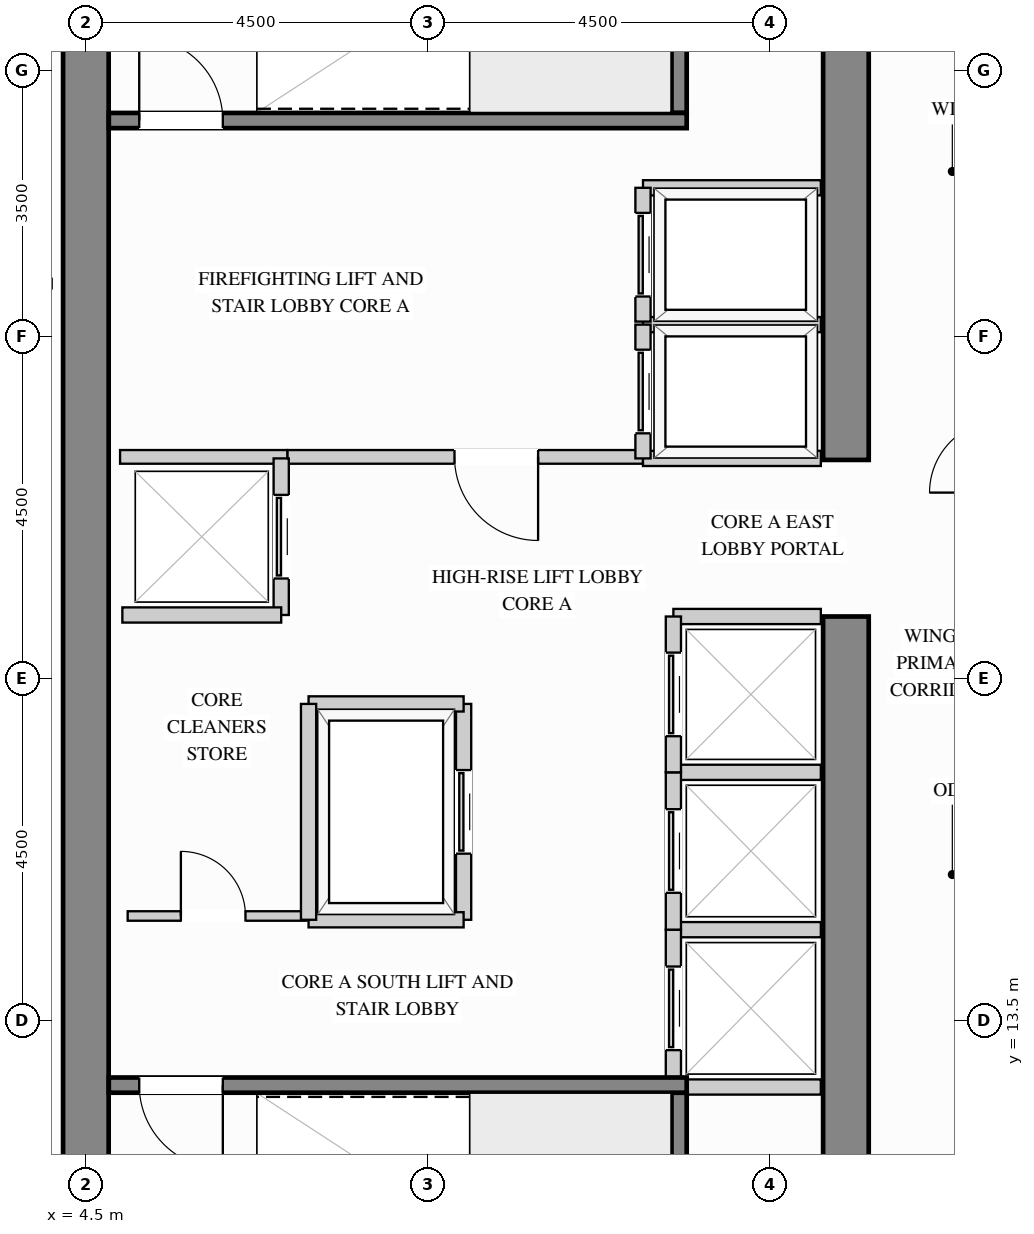
"""IFC4 building model, lengths in metres.
Left out: names, types, materials, properties, quantities, classifications, styles, units other than length and angle.
Written with IfcOpenShell. Run it as: python <this file> out.ifc"""

import sys

from ifc_helpers import new_model, si_unit, direction, frame, frame_2d, origin, place, context, subcontext, project, spatial, rectangle, extrude, source, transform, mapped, element, fill, save


model = new_model("IFC4")
c1 = context("Model", 3, precision=1e-05, world=origin(), true_north=direction((0.0, 1.0)))
c2 = subcontext(c1, "Body", "Model", "MODEL_VIEW")
j1 = project(units=[si_unit("LENGTHUNIT", "METRE"), si_unit("PLANEANGLEUNIT", "RADIAN")], contexts=[c1])
p1 = place(None, origin())
s1 = spatial("IfcSite", under=j1, at=p1, CompositionType="ELEMENT")
p2 = place(p1, origin())
s2 = spatial("IfcBuilding", under=s1, at=p2, CompositionType="ELEMENT")
p3 = place(p2, frame((0.0, 0.0, 179.1)))
s3 = spatial("IfcBuildingStorey", under=s2, at=p3, CompositionType="ELEMENT", Elevation=179.1)
m1 = source(origin(), c2, "Body", "SweptSolid", [
    extrude(rectangle(XDim=10.02, YDim=0.6, at=frame_2d((5.01, 0.0))), origin(), (0.0, 0.0, 1.0), 3.4),
])
p4 = place(p3, frame((14.5, 8.8, 0.0), z_axis=(0.0, 0.0, 1.0), x_axis=(0.0, 1.0, 0.0)))
e1 = element("IfcWall", 1, at=p4, inside=s3, PredefinedType="SHEAR", context=c2, shape_type="MappedRepresentation", body=[
    mapped(m1, transform((0.0, 0.0, 0.0), x_axis=(1.0, 0.0, 0.0), y_axis=(0.0, 1.0, 0.0), z_axis=(0.0, 0.0, 1.0))),
])
m2 = source(origin(), c2, "Body", "SweptSolid", [
    extrude(rectangle(XDim=8.32, YDim=0.6, at=frame_2d((4.16, 0.0))), origin(), (0.0, 0.0, 1.0), 3.4),
])
p5 = place(p3, frame((14.5, 20.88, 0.0), z_axis=(0.0, 0.0, 1.0), x_axis=(0.0, 1.0, 0.0)))
e2 = element("IfcWall", 2, at=p5, inside=s3, PredefinedType="SHEAR", context=c2, shape_type="MappedRepresentation", body=[
    mapped(m2, transform((0.0, 0.0, 0.0), x_axis=(1.0, 0.0, 0.0), y_axis=(0.0, 1.0, 0.0), z_axis=(0.0, 0.0, 1.0))),
])
m3 = source(origin(), c2, "Body", "SweptSolid", [
    extrude(rectangle(XDim=20.4, YDim=0.6, at=frame_2d((10.2, 0.0))), origin(), (0.0, 0.0, 1.0), 3.4),
])
p6 = place(p3, frame((4.5, 8.8, 0.0), z_axis=(0.0, 0.0, 1.0), x_axis=(0.0, 1.0, 0.0)))
e3 = element("IfcWall", 3, at=p6, inside=s3, PredefinedType="SHEAR", context=c2, shape_type="MappedRepresentation", body=[
    mapped(m3, transform((0.0, 0.0, 0.0), x_axis=(1.0, 0.0, 0.0), y_axis=(0.0, 1.0, 0.0), z_axis=(0.0, 0.0, 1.0))),
])
p7 = place(p3, frame((7.15, 20.92, 0.0), z_axis=(0.0, 0.0, 1.0), x_axis=(1.0, 0.0, 0.0)))
e4 = element("IfcWall", 4, at=p7, inside=s3, PredefinedType="PARTITIONING", context=c2, shape_type="SweptSolid", body=[
    extrude(rectangle(XDim=4.68, YDim=0.18, at=frame_2d((2.34, 0.0))), origin(), (0.0, 0.0, 1.0), 3.385),
])
p8 = place(p7, frame((2.2, 0.0, 0.0)))
e5 = element("IfcOpeningElement", 5, at=p8, cuts=e4, PredefinedType="OPENING", context=c2, shape_type="SweptSolid", body=[
    extrude(rectangle(XDim=1.1, YDim=2.15, at=frame_2d((0.55, 1.075))), frame((0.0, 0.1, 0.0), z_axis=(0.0, -1.0, 0.0), x_axis=(1.0, 0.0, 0.0)), (0.0, 0.0, 1.0), 0.2),
])
m4 = source(origin(), c2, "Body", "SweptSolid", [
    extrude(rectangle(XDim=2.2, YDim=0.18, at=frame_2d((1.1, 0.0))), origin(), (0.0, 0.0, 1.0), 3.385),
])
p9 = place(p3, frame((4.95, 20.92, 0.0), z_axis=(0.0, 0.0, 1.0), x_axis=(1.0, 0.0, 0.0)))
e6 = element("IfcWall", 6, at=p9, inside=s3, PredefinedType="PARTITIONING", context=c2, shape_type="MappedRepresentation", body=[
    mapped(m4, transform((0.0, 0.0, 0.0), x_axis=(1.0, 0.0, 0.0), y_axis=(0.0, 1.0, 0.0), z_axis=(0.0, 0.0, 1.0))),
])
p10 = place(p3, frame((5.05, 14.88, 0.0), z_axis=(0.0, 0.0, 1.0), x_axis=(1.0, 0.0, 0.0)))
e7 = element("IfcWall", 7, at=p10, inside=s3, PredefinedType="PARTITIONING", context=c2, shape_type="SweptSolid", body=[
    extrude(rectangle(XDim=2.35, YDim=0.125, at=frame_2d((1.175, 0.0))), origin(), (0.0, 0.0, 1.0), 3.385),
])
p11 = place(p10, frame((0.7, 0.0, 0.0)))
e8 = element("IfcOpeningElement", 8, at=p11, cuts=e7, PredefinedType="OPENING", context=c2, shape_type="SweptSolid", body=[
    extrude(rectangle(XDim=0.85, YDim=2.1, at=frame_2d((0.425, 1.05))), frame((0.0, 0.073, 0.0), z_axis=(0.0, -1.0, 0.0), x_axis=(1.0, 0.0, 0.0)), (0.0, 0.0, 1.0), 0.145),
])
m5 = source(origin(), c2, "Body", "SweptSolid", [
    extrude(rectangle(XDim=3.698, YDim=0.125, at=frame_2d((1.849, 0.0))), origin(), (0.0, 0.0, 1.0), 3.385),
])
p12 = place(p3, frame((0.352, 23.2, 0.0), z_axis=(0.0, 0.0, 1.0), x_axis=(1.0, 0.0, 0.0)))
e9 = element("IfcWall", 9, at=p12, inside=s3, PredefinedType="PARTITIONING", context=c2, shape_type="MappedRepresentation", body=[
    mapped(m5, transform((0.0, 0.0, 0.0), x_axis=(1.0, 0.0, 0.0), y_axis=(0.0, 1.0, 0.0), z_axis=(0.0, 0.0, 1.0))),
])
m6 = source(origin(), c2, "Body", "SweptSolid", [
    extrude(rectangle(XDim=2.34, YDim=0.2, at=frame_2d((1.17, 0.0))), origin(), (0.0, 0.0, 1.0), 3.385),
])
for number, where, z_axis, x_axis in (
    (10, (11.83, 22.66, 0.0), (0.0, 0.0, 1.0), (1.0, 0.0, 0.0)),
    (11, (11.83, 20.9, 0.0), (0.0, 0.0, 1.0), (1.0, 0.0, 0.0)),
):
    element("IfcWall", number, at=place(p3, frame(where, z_axis=z_axis, x_axis=x_axis)), inside=s3, PredefinedType="PARTITIONING", context=c2, shape_type="MappedRepresentation", body=[
        mapped(m6, transform((0.0, 0.0, 0.0), x_axis=(1.0, 0.0, 0.0), y_axis=(0.0, 1.0, 0.0), z_axis=(0.0, 0.0, 1.0))),
    ])
p13 = place(p3, frame((11.83, 20.9, 0.0), z_axis=(0.0, 0.0, 1.0), x_axis=(0.0, 1.0, 0.0)))
e12 = element("IfcWall", 12, at=p13, inside=s3, PredefinedType="PARTITIONING", context=c2, shape_type="SweptSolid", body=[
    extrude(rectangle(XDim=1.76, YDim=0.2, at=frame_2d((0.88, 0.0))), origin(), (0.0, 0.0, 1.0), 3.385),
])
p14 = place(p13, frame((0.33, 0.0, 0.0)))
e13 = element("IfcOpeningElement", 13, at=p14, cuts=e12, PredefinedType="OPENING", context=c2, shape_type="SweptSolid", body=[
    extrude(rectangle(XDim=1.1, YDim=2.2, at=frame_2d((0.55, 1.1))), frame((0.0, 0.11, 0.0), z_axis=(0.0, -1.0, 0.0), x_axis=(1.0, 0.0, 0.0)), (0.0, 0.0, 1.0), 0.22),
])
p15 = place(p3, frame((11.83, 24.46, 0.0), z_axis=(0.0, 0.0, 1.0), x_axis=(1.0, 0.0, 0.0)))
e14 = element("IfcWall", 14, at=p15, inside=s3, PredefinedType="PARTITIONING", context=c2, shape_type="MappedRepresentation", body=[
    mapped(m6, transform((0.0, 0.0, 0.0), x_axis=(1.0, 0.0, 0.0), y_axis=(0.0, 1.0, 0.0), z_axis=(0.0, 0.0, 1.0))),
])
p16 = place(p3, frame((11.83, 22.7, 0.0), z_axis=(0.0, 0.0, 1.0), x_axis=(0.0, 1.0, 0.0)))
e15 = element("IfcWall", 15, at=p16, inside=s3, PredefinedType="PARTITIONING", context=c2, shape_type="SweptSolid", body=[
    extrude(rectangle(XDim=1.76, YDim=0.2, at=frame_2d((0.88, 0.0))), origin(), (0.0, 0.0, 1.0), 3.385),
])
p17 = place(p16, frame((0.33, 0.0, 0.0)))
e16 = element("IfcOpeningElement", 16, at=p17, cuts=e15, PredefinedType="OPENING", context=c2, shape_type="SweptSolid", body=[
    extrude(rectangle(XDim=1.1, YDim=2.2, at=frame_2d((0.55, 1.1))), frame((0.0, 0.11, 0.0), z_axis=(0.0, -1.0, 0.0), x_axis=(1.0, 0.0, 0.0)), (0.0, 0.0, 1.0), 0.22),
])
m7 = source(origin(), c2, "Body", "SweptSolid", [
    extrude(rectangle(XDim=1.94, YDim=0.2, at=frame_2d((0.97, 0.0))), origin(), (0.0, 0.0, 1.0), 3.385),
])
for number, where, z_axis, x_axis in (
    (17, (12.23, 14.7, 0.0), (0.0, 0.0, 1.0), (1.0, 0.0, 0.0)),
    (18, (12.23, 12.63, 0.0), (0.0, 0.0, 1.0), (1.0, 0.0, 0.0)),
):
    element("IfcWall", number, at=place(p3, frame(where, z_axis=z_axis, x_axis=x_axis)), inside=s3, PredefinedType="PARTITIONING", context=c2, shape_type="MappedRepresentation", body=[
        mapped(m7, transform((0.0, 0.0, 0.0), x_axis=(1.0, 0.0, 0.0), y_axis=(0.0, 1.0, 0.0), z_axis=(0.0, 0.0, 1.0))),
    ])
p18 = place(p3, frame((12.23, 12.63, 0.0), z_axis=(0.0, 0.0, 1.0), x_axis=(0.0, 1.0, 0.0)))
e19 = element("IfcWall", 19, at=p18, inside=s3, PredefinedType="PARTITIONING", context=c2, shape_type="SweptSolid", body=[
    extrude(rectangle(XDim=2.07, YDim=0.2, at=frame_2d((1.035, 0.0))), origin(), (0.0, 0.0, 1.0), 3.385),
])
p19 = place(p18, frame((0.485, 0.0, 0.0)))
e20 = element("IfcOpeningElement", 20, at=p19, cuts=e19, PredefinedType="OPENING", context=c2, shape_type="SweptSolid", body=[
    extrude(rectangle(XDim=1.1, YDim=2.2, at=frame_2d((0.55, 1.1))), frame((0.0, 0.11, 0.0), z_axis=(0.0, -1.0, 0.0), x_axis=(1.0, 0.0, 0.0)), (0.0, 0.0, 1.0), 0.22),
])
p20 = place(p3, frame((12.23, 16.77, 0.0), z_axis=(0.0, 0.0, 1.0), x_axis=(1.0, 0.0, 0.0)))
e21 = element("IfcWall", 21, at=p20, inside=s3, PredefinedType="PARTITIONING", context=c2, shape_type="MappedRepresentation", body=[
    mapped(m7, transform((0.0, 0.0, 0.0), x_axis=(1.0, 0.0, 0.0), y_axis=(0.0, 1.0, 0.0), z_axis=(0.0, 0.0, 1.0))),
])
p21 = place(p3, frame((12.23, 14.7, 0.0), z_axis=(0.0, 0.0, 1.0), x_axis=(0.0, 1.0, 0.0)))
e22 = element("IfcWall", 22, at=p21, inside=s3, PredefinedType="PARTITIONING", context=c2, shape_type="SweptSolid", body=[
    extrude(rectangle(XDim=2.07, YDim=0.2, at=frame_2d((1.035, 0.0))), origin(), (0.0, 0.0, 1.0), 3.385),
])
p22 = place(p21, frame((0.485, 0.0, 0.0)))
e23 = element("IfcOpeningElement", 23, at=p22, cuts=e22, PredefinedType="OPENING", context=c2, shape_type="SweptSolid", body=[
    extrude(rectangle(XDim=1.1, YDim=2.2, at=frame_2d((0.55, 1.1))), frame((0.0, 0.11, 0.0), z_axis=(0.0, -1.0, 0.0), x_axis=(1.0, 0.0, 0.0)), (0.0, 0.0, 1.0), 0.22),
])
p23 = place(p3, frame((12.23, 18.82, 0.0), z_axis=(0.0, 0.0, 1.0), x_axis=(1.0, 0.0, 0.0)))
e24 = element("IfcWall", 24, at=p23, inside=s3, PredefinedType="PARTITIONING", context=c2, shape_type="MappedRepresentation", body=[
    mapped(m7, transform((0.0, 0.0, 0.0), x_axis=(1.0, 0.0, 0.0), y_axis=(0.0, 1.0, 0.0), z_axis=(0.0, 0.0, 1.0))),
])
p24 = place(p3, frame((12.23, 16.77, 0.0), z_axis=(0.0, 0.0, 1.0), x_axis=(0.0, 1.0, 0.0)))
e25 = element("IfcWall", 25, at=p24, inside=s3, PredefinedType="PARTITIONING", context=c2, shape_type="SweptSolid", body=[
    extrude(rectangle(XDim=2.05, YDim=0.2, at=frame_2d((1.025, 0.0))), origin(), (0.0, 0.0, 1.0), 3.385),
])
p25 = place(p24, frame((0.475, 0.0, 0.0)))
e26 = element("IfcOpeningElement", 26, at=p25, cuts=e25, PredefinedType="OPENING", context=c2, shape_type="SweptSolid", body=[
    extrude(rectangle(XDim=1.1, YDim=2.2, at=frame_2d((0.55, 1.1))), frame((0.0, 0.11, 0.0), z_axis=(0.0, -1.0, 0.0), x_axis=(1.0, 0.0, 0.0)), (0.0, 0.0, 1.0), 0.22),
])
p26 = place(p3, frame((7.07, 18.84, 0.0), z_axis=(0.0, 0.0, 1.0), x_axis=(0.0, 1.0, 0.0)))
e27 = element("IfcWall", 27, at=p26, inside=s3, PredefinedType="PARTITIONING", context=c2, shape_type="SweptSolid", body=[
    extrude(rectangle(XDim=2.06, YDim=0.2, at=frame_2d((1.03, 0.0))), origin(), (0.0, 0.0, 1.0), 3.385),
])
p27 = place(p26, frame((0.48, 0.0, 0.0)))
e28 = element("IfcOpeningElement", 28, at=p27, cuts=e27, PredefinedType="OPENING", context=c2, shape_type="SweptSolid", body=[
    extrude(rectangle(XDim=1.1, YDim=2.2, at=frame_2d((0.55, 1.1))), frame((0.0, 0.11, 0.0), z_axis=(0.0, -1.0, 0.0), x_axis=(1.0, 0.0, 0.0)), (0.0, 0.0, 1.0), 0.22),
])
m8 = source(origin(), c2, "Body", "SweptSolid", [
    extrude(rectangle(XDim=2.09, YDim=0.2, at=frame_2d((1.045, 0.0))), origin(), (0.0, 0.0, 1.0), 3.385),
])
p28 = place(p3, frame((4.98, 18.84, 0.0), z_axis=(0.0, 0.0, 1.0), x_axis=(1.0, 0.0, 0.0)))
e29 = element("IfcWall", 29, at=p28, inside=s3, PredefinedType="PARTITIONING", context=c2, shape_type="MappedRepresentation", body=[
    mapped(m8, transform((0.0, 0.0, 0.0), x_axis=(1.0, 0.0, 0.0), y_axis=(0.0, 1.0, 0.0), z_axis=(0.0, 0.0, 1.0))),
])
p29 = place(p3, frame((9.47, 14.83, 0.0), z_axis=(0.0, 0.0, 1.0), x_axis=(0.0, 1.0, 0.0)))
e30 = element("IfcWall", 30, at=p29, inside=s3, PredefinedType="PARTITIONING", context=c2, shape_type="SweptSolid", body=[
    extrude(rectangle(XDim=2.84, YDim=0.2, at=frame_2d((1.42, 0.0))), origin(), (0.0, 0.0, 1.0), 3.385),
])
p30 = place(p29, frame((0.87, 0.0, 0.0)))
e31 = element("IfcOpeningElement", 31, at=p30, cuts=e30, PredefinedType="OPENING", context=c2, shape_type="SweptSolid", body=[
    extrude(rectangle(XDim=1.1, YDim=2.2, at=frame_2d((0.55, 1.1))), frame((0.0, 0.11, 0.0), z_axis=(0.0, -1.0, 0.0), x_axis=(1.0, 0.0, 0.0)), (0.0, 0.0, 1.0), 0.22),
])
m9 = source(origin(), c2, "Body", "SweptSolid", [
    extrude(rectangle(XDim=2.04, YDim=0.2, at=frame_2d((1.02, 0.0))), origin(), (0.0, 0.0, 1.0), 3.385),
])
for number, where, z_axis, x_axis in (
    (32, (7.43, 17.67, 0.0), (0.0, 0.0, 1.0), (1.0, 0.0, 0.0)),
    (33, (7.43, 14.83, 0.0), (0.0, 0.0, 1.0), (1.0, 0.0, 0.0)),
):
    element("IfcWall", number, at=place(p3, frame(where, z_axis=z_axis, x_axis=x_axis)), inside=s3, PredefinedType="PARTITIONING", context=c2, shape_type="MappedRepresentation", body=[
        mapped(m9, transform((0.0, 0.0, 0.0), x_axis=(1.0, 0.0, 0.0), y_axis=(0.0, 1.0, 0.0), z_axis=(0.0, 0.0, 1.0))),
    ])
m10 = source(origin(), c2, "Body", "SweptSolid", [
    extrude(rectangle(XDim=2.84, YDim=0.2, at=frame_2d((1.42, 0.0))), origin(), (0.0, 0.0, 1.0), 3.385),
])
p31 = place(p3, frame((7.43, 14.83, 0.0), z_axis=(0.0, 0.0, 1.0), x_axis=(0.0, 1.0, 0.0)))
e34 = element("IfcWall", 34, at=p31, inside=s3, PredefinedType="PARTITIONING", context=c2, shape_type="MappedRepresentation", body=[
    mapped(m10, transform((0.0, 0.0, 0.0), x_axis=(1.0, 0.0, 0.0), y_axis=(0.0, 1.0, 0.0), z_axis=(0.0, 0.0, 1.0))),
])
m11 = source(origin(), c2, "Body", "SweptSolid", [
    extrude(rectangle(XDim=3.753, YDim=0.2, at=frame_2d((1.876, 0.0))), origin(), (0.0, 0.0, 1.0), 3.4),
])
p32 = place(p3, frame((12.305, 8.802, 0.0), z_axis=(0.0, 0.0, 1.0), x_axis=(0.0, 1.0, 0.0)))
e35 = element("IfcWall", 35, at=p32, inside=s3, PredefinedType="SHEAR", context=c2, shape_type="MappedRepresentation", body=[
    mapped(m11, transform((0.0, 0.0, 0.0), x_axis=(1.0, 0.0, 0.0), y_axis=(0.0, 1.0, 0.0), z_axis=(0.0, 0.0, 1.0))),
])
p33 = place(p3, frame((4.802, 12.655, 0.0), z_axis=(0.0, 0.0, 1.0), x_axis=(1.0, 0.0, 0.0)))
e36 = element("IfcWall", 36, at=p33, inside=s3, PredefinedType="SHEAR", context=c2, shape_type="SweptSolid", body=[
    extrude(rectangle(XDim=7.603, YDim=0.2, at=frame_2d((3.802, 0.0))), origin(), (0.0, 0.0, 1.0), 3.4),
])
p34 = place(p33, frame((0.4, 0.0, 0.0)))
e37 = element("IfcOpeningElement", 37, at=p34, cuts=e36, PredefinedType="OPENING", context=c2, shape_type="SweptSolid", body=[
    extrude(rectangle(XDim=1.1, YDim=2.15, at=frame_2d((0.55, 1.075))), frame((0.0, 0.11, 0.0), z_axis=(0.0, -1.0, 0.0), x_axis=(1.0, 0.0, 0.0)), (0.0, 0.0, 1.0), 0.22),
])
p35 = place(p3, frame((12.305, 25.445, 0.0), z_axis=(0.0, 0.0, 1.0), x_axis=(0.0, 1.0, 0.0)))
e38 = element("IfcWall", 38, at=p35, inside=s3, PredefinedType="SHEAR", context=c2, shape_type="MappedRepresentation", body=[
    mapped(m11, transform((0.0, 0.0, 0.0), x_axis=(1.0, 0.0, 0.0), y_axis=(0.0, 1.0, 0.0), z_axis=(0.0, 0.0, 1.0))),
])
p36 = place(p3, frame((4.802, 25.345, 0.0), z_axis=(0.0, 0.0, 1.0), x_axis=(1.0, 0.0, 0.0)))
e39 = element("IfcWall", 39, at=p36, inside=s3, PredefinedType="SHEAR", context=c2, shape_type="SweptSolid", body=[
    extrude(rectangle(XDim=7.603, YDim=0.2, at=frame_2d((3.802, 0.0))), origin(), (0.0, 0.0, 1.0), 3.4),
])
p37 = place(p36, frame((0.4, 0.0, 0.0)))
e40 = element("IfcOpeningElement", 40, at=p37, cuts=e39, PredefinedType="OPENING", context=c2, shape_type="SweptSolid", body=[
    extrude(rectangle(XDim=1.1, YDim=2.15, at=frame_2d((0.55, 1.075))), frame((0.0, 0.11, 0.0), z_axis=(0.0, -1.0, 0.0), x_axis=(1.0, 0.0, 0.0)), (0.0, 0.0, 1.0), 0.22),
])
m12 = source(origin(), c2, "Body", "SweptSolid", [
    extrude(rectangle(XDim=1.1, YDim=2.15, at=frame_2d((0.55, 1.075))), frame((0.0, 0.025, 0.0), z_axis=(0.0, -1.0, 0.0), x_axis=(1.0, 0.0, 0.0)), (0.0, 0.0, 1.0), 0.05),
])
p38 = place(p8, origin())
e41 = element("IfcDoor", 41, at=p38, inside=s3, OperationType="SINGLE_SWING_RIGHT", PredefinedType="DOOR", context=c2, shape_type="MappedRepresentation", body=[
    mapped(m12, transform((0.0, 0.0, 0.0), x_axis=(1.0, 0.0, 0.0), y_axis=(0.0, 1.0, 0.0), z_axis=(0.0, 0.0, 1.0))),
])
fill(e5, e41)
m13 = source(origin(), c2, "Body", "SweptSolid", [
    extrude(rectangle(XDim=1.1, YDim=2.2, at=frame_2d((0.55, 1.1))), frame((0.0, 0.025, 0.0), z_axis=(0.0, -1.0, 0.0), x_axis=(1.0, 0.0, 0.0)), (0.0, 0.0, 1.0), 0.05),
])
p39 = place(p14, origin())
e42 = element("IfcDoor", 42, at=p39, inside=s3, OperationType="SLIDING_TO_LEFT", PredefinedType="DOOR", context=c2, shape_type="MappedRepresentation", body=[
    mapped(m13, transform((0.0, 0.0, 0.0), x_axis=(1.0, 0.0, 0.0), y_axis=(0.0, 1.0, 0.0), z_axis=(0.0, 0.0, 1.0))),
])
fill(e13, e42)
p40 = place(p17, origin())
e43 = element("IfcDoor", 43, at=p40, inside=s3, OperationType="SLIDING_TO_LEFT", PredefinedType="DOOR", context=c2, shape_type="MappedRepresentation", body=[
    mapped(m13, transform((0.0, 0.0, 0.0), x_axis=(1.0, 0.0, 0.0), y_axis=(0.0, 1.0, 0.0), z_axis=(0.0, 0.0, 1.0))),
])
fill(e16, e43)
p41 = place(p19, origin())
e44 = element("IfcDoor", 44, at=p41, inside=s3, OperationType="SLIDING_TO_LEFT", PredefinedType="DOOR", context=c2, shape_type="MappedRepresentation", body=[
    mapped(m13, transform((0.0, 0.0, 0.0), x_axis=(1.0, 0.0, 0.0), y_axis=(0.0, 1.0, 0.0), z_axis=(0.0, 0.0, 1.0))),
])
fill(e20, e44)
p42 = place(p22, origin())
e45 = element("IfcDoor", 45, at=p42, inside=s3, OperationType="SLIDING_TO_LEFT", PredefinedType="DOOR", context=c2, shape_type="MappedRepresentation", body=[
    mapped(m13, transform((0.0, 0.0, 0.0), x_axis=(1.0, 0.0, 0.0), y_axis=(0.0, 1.0, 0.0), z_axis=(0.0, 0.0, 1.0))),
])
fill(e23, e45)
p43 = place(p25, origin())
e46 = element("IfcDoor", 46, at=p43, inside=s3, OperationType="SLIDING_TO_LEFT", PredefinedType="DOOR", context=c2, shape_type="MappedRepresentation", body=[
    mapped(m13, transform((0.0, 0.0, 0.0), x_axis=(1.0, 0.0, 0.0), y_axis=(0.0, 1.0, 0.0), z_axis=(0.0, 0.0, 1.0))),
])
fill(e26, e46)
p44 = place(p27, origin())
e47 = element("IfcDoor", 47, at=p44, inside=s3, OperationType="SLIDING_TO_LEFT", PredefinedType="DOOR", context=c2, shape_type="MappedRepresentation", body=[
    mapped(m13, transform((0.0, 0.0, 0.0), x_axis=(1.0, 0.0, 0.0), y_axis=(0.0, 1.0, 0.0), z_axis=(0.0, 0.0, 1.0))),
])
fill(e28, e47)
p45 = place(p30, origin())
e48 = element("IfcDoor", 48, at=p45, inside=s3, OperationType="SLIDING_TO_LEFT", PredefinedType="DOOR", context=c2, shape_type="MappedRepresentation", body=[
    mapped(m13, transform((0.0, 0.0, 0.0), x_axis=(1.0, 0.0, 0.0), y_axis=(0.0, 1.0, 0.0), z_axis=(0.0, 0.0, 1.0))),
])
fill(e31, e48)
m14 = source(origin(), c2, "Body", "SweptSolid", [
    extrude(rectangle(XDim=0.85, YDim=2.1, at=frame_2d((0.425, 1.05))), frame((0.0, 0.025, 0.0), z_axis=(0.0, -1.0, 0.0), x_axis=(1.0, 0.0, 0.0)), (0.0, 0.0, 1.0), 0.05),
])
p46 = place(p11, origin())
e49 = element("IfcDoor", 49, at=p46, inside=s3, OperationType="SINGLE_SWING_LEFT", PredefinedType="DOOR", context=c2, shape_type="MappedRepresentation", body=[
    mapped(m14, transform((0.0, 0.0, 0.0), x_axis=(1.0, 0.0, 0.0), y_axis=(0.0, 1.0, 0.0), z_axis=(0.0, 0.0, 1.0))),
])
fill(e8, e49)
m15 = source(origin(), c2, "Body", "SweptSolid", [
    extrude(rectangle(XDim=1.1, YDim=2.15, at=frame_2d((0.55, 1.075))), frame((0.0, 0.025, 0.0), z_axis=(0.0, -1.0, 0.0), x_axis=(1.0, 0.0, 0.0)), (0.0, 0.0, 1.0), 0.05),
])
p47 = place(p34, origin())
e50 = element("IfcDoor", 50, at=p47, inside=s3, OperationType="SINGLE_SWING_RIGHT", PredefinedType="DOOR", context=c2, shape_type="MappedRepresentation", body=[
    mapped(m15, transform((0.0, 0.0, 0.0), x_axis=(1.0, 0.0, 0.0), y_axis=(0.0, 1.0, 0.0), z_axis=(0.0, 0.0, 1.0))),
])
fill(e37, e50)
p48 = place(p37, origin())
e51 = element("IfcDoor", 51, at=p48, inside=s3, OperationType="SINGLE_SWING_LEFT", PredefinedType="DOOR", context=c2, shape_type="MappedRepresentation", body=[
    mapped(m15, transform((0.0, 0.0, 0.0), x_axis=(1.0, 0.0, 0.0), y_axis=(0.0, 1.0, 0.0), z_axis=(0.0, 0.0, 1.0))),
])
fill(e40, e51)
save(model, sys.argv[1])
